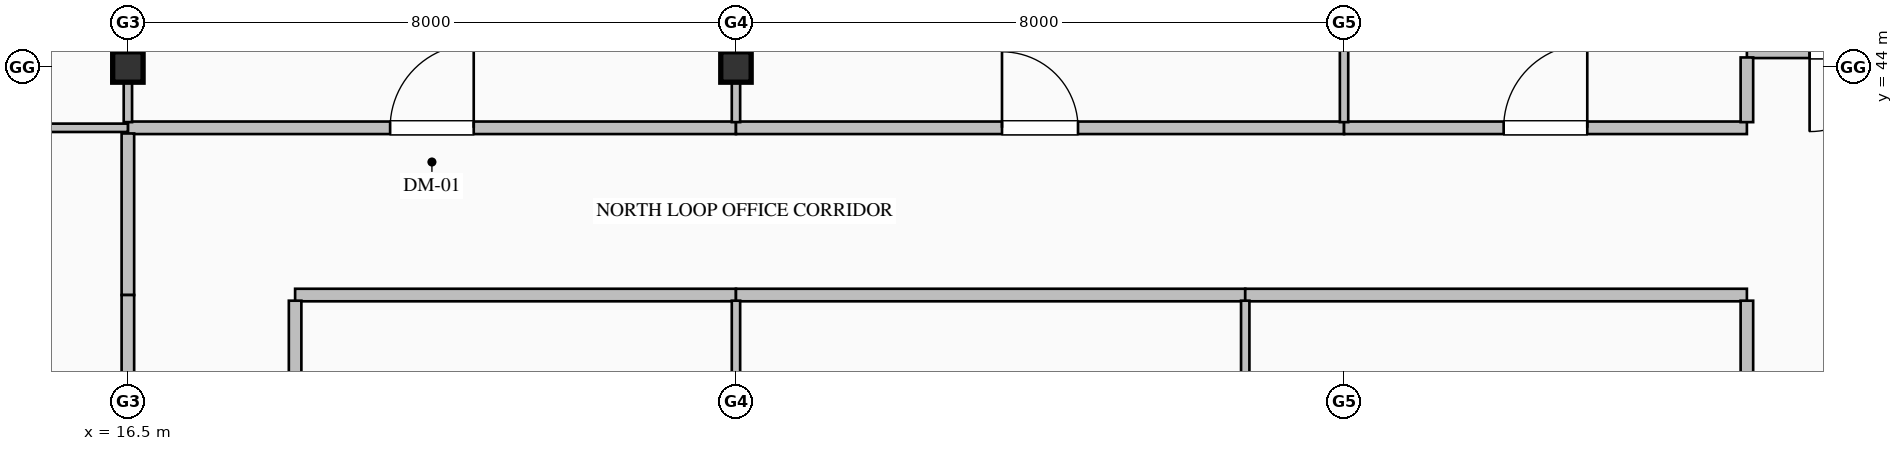
"""IFC4 building model, lengths in metres.
Left out: names, types, materials, properties, quantities, classifications, styles, units other than length and angle.
Written with IfcOpenShell. Run it as: python <this file> out.ifc"""

import sys

from ifc_helpers import new_model, si_unit, direction, frame, frame_2d, origin, origin_2d, place, context, subcontext, project, spatial, rectangle, i_section, extrude, element, fill, save


model = new_model("IFC4")
c1 = context("Model", 3, precision=1e-05, world=origin(), true_north=direction((0.0, 1.0)))
c2 = subcontext(c1, "Body", "Model", "MODEL_VIEW")
j1 = project(units=[si_unit("LENGTHUNIT", "METRE"), si_unit("PLANEANGLEUNIT", "RADIAN")], contexts=[c1])
p1 = place(None, origin())
s1 = spatial("IfcSite", under=j1, at=p1, CompositionType="ELEMENT")
p2 = place(p1, origin())
s2 = spatial("IfcBuilding", under=s1, at=p2, CompositionType="ELEMENT")
p3 = place(p2, frame((0.0, 0.0, 131.0)))
s3 = spatial("IfcBuildingStorey", under=s2, at=p3, CompositionType="ELEMENT", Elevation=131.0)
for number, where, z_axis, x_axis in (
    (1, (16.5, 44.0, 0.0), (0.0, 0.0, 1.0), (1.0, 0.0, 0.0)),
    (2, (24.5, 44.0, 0.0), (0.0, 0.0, 1.0), (1.0, 0.0, 0.0)),
):
    element("IfcColumn", number, at=place(p3, frame(where, z_axis=z_axis, x_axis=x_axis)), inside=s3, PredefinedType="COLUMN", context=c2, shape_type="SweptSolid", body=[
        extrude(i_section(OverallWidth=0.4, OverallDepth=0.4, WebThickness=0.013, FlangeThickness=0.021, FilletRadius=0.022, at=origin_2d()), origin(), (0.0, 0.0, 1.0), 4.0),
    ])
p4 = place(p3, frame((40.5, 44.2, 0.0), z_axis=(0.0, 0.0, 1.0), x_axis=(-1.0, 0.0, 0.0)))
e3 = element("IfcWall", 3, at=p4, inside=s3, PredefinedType="PARTITIONING", context=c2, shape_type="SweptSolid", body=[
    extrude(rectangle(XDim=2.7, YDim=0.165, at=frame_2d((1.35, 0.0))), origin(), (0.0, 0.0, 1.0), 3.765),
])
p5 = place(p4, frame((0.825, 0.0, 0.0)))
e4 = element("IfcOpeningElement", 4, at=p5, cuts=e3, PredefinedType="OPENING", context=c2, shape_type="SweptSolid", body=[
    extrude(rectangle(XDim=1.05, YDim=2.15, at=frame_2d((0.525, 1.075))), frame((0.0, 0.093, 0.0), z_axis=(0.0, -1.0, 0.0), x_axis=(1.0, 0.0, 0.0)), (0.0, 0.0, 1.0), 0.185),
])
p6 = place(p3, frame((16.5, 43.2, 0.0), z_axis=(0.0, 0.0, 1.0), x_axis=(1.0, 0.0, 0.0)))
e5 = element("IfcWall", 5, at=p6, inside=s3, PredefinedType="PARTITIONING", context=c2, shape_type="SweptSolid", body=[
    extrude(rectangle(XDim=8.0, YDim=0.165, at=frame_2d((4.0, 0.0))), origin(), (0.0, 0.0, 1.0), 3.765),
])
p7 = place(p6, frame((3.45, 0.0, 0.0)))
e6 = element("IfcOpeningElement", 6, at=p7, cuts=e5, PredefinedType="OPENING", context=c2, shape_type="SweptSolid", body=[
    extrude(rectangle(XDim=1.1, YDim=2.2, at=frame_2d((0.55, 1.1))), frame((0.0, 0.093, 0.0), z_axis=(0.0, -1.0, 0.0), x_axis=(1.0, 0.0, 0.0)), (0.0, 0.0, 1.0), 0.185),
])
p8 = place(p3, frame((24.5, 43.2, 0.0), z_axis=(0.0, 0.0, 1.0), x_axis=(1.0, 0.0, 0.0)))
e7 = element("IfcWall", 7, at=p8, inside=s3, PredefinedType="PARTITIONING", context=c2, shape_type="SweptSolid", body=[
    extrude(rectangle(XDim=8.0, YDim=0.165, at=frame_2d((4.0, 0.0))), origin(), (0.0, 0.0, 1.0), 3.765),
])
p9 = place(p8, frame((3.5, 0.0, 0.0)))
e8 = element("IfcOpeningElement", 8, at=p9, cuts=e7, PredefinedType="OPENING", context=c2, shape_type="SweptSolid", body=[
    extrude(rectangle(XDim=1.0, YDim=2.15, at=frame_2d((0.5, 1.075))), frame((0.0, 0.093, 0.0), z_axis=(0.0, -1.0, 0.0), x_axis=(1.0, 0.0, 0.0)), (0.0, 0.0, 1.0), 0.185),
])
p10 = place(p3, frame((32.5, 43.2, 0.0), z_axis=(0.0, 0.0, 1.0), x_axis=(1.0, 0.0, 0.0)))
e9 = element("IfcWall", 9, at=p10, inside=s3, PredefinedType="PARTITIONING", context=c2, shape_type="SweptSolid", body=[
    extrude(rectangle(XDim=5.3, YDim=0.165, at=frame_2d((2.65, 0.0))), origin(), (0.0, 0.0, 1.0), 3.765),
])
p11 = place(p10, frame((2.1, 0.0, 0.0)))
e10 = element("IfcOpeningElement", 10, at=p11, cuts=e9, PredefinedType="OPENING", context=c2, shape_type="SweptSolid", body=[
    extrude(rectangle(XDim=1.1, YDim=2.2, at=frame_2d((0.55, 1.1))), frame((0.0, 0.093, 0.0), z_axis=(0.0, -1.0, 0.0), x_axis=(1.0, 0.0, 0.0)), (0.0, 0.0, 1.0), 0.185),
])
p12 = place(p3, frame((24.5, 41.0, 0.0), z_axis=(0.0, 0.0, 1.0), x_axis=(-1.0, 0.0, 0.0)))
e11 = element("IfcWall", 11, at=p12, inside=s3, PredefinedType="PARTITIONING", context=c2, shape_type="SweptSolid", body=[
    extrude(rectangle(XDim=5.8, YDim=0.165, at=frame_2d((2.9, 0.0))), origin(), (0.0, 0.0, 1.0), 3.765),
])
p13 = place(p3, frame((31.2, 41.0, 0.0), z_axis=(0.0, 0.0, 1.0), x_axis=(-1.0, 0.0, 0.0)))
e12 = element("IfcWall", 12, at=p13, inside=s3, PredefinedType="PARTITIONING", context=c2, shape_type="SweptSolid", body=[
    extrude(rectangle(XDim=6.7, YDim=0.165, at=frame_2d((3.35, 0.0))), origin(), (0.0, 0.0, 1.0), 3.765),
])
p14 = place(p3, frame((37.8, 41.0, 0.0), z_axis=(0.0, 0.0, 1.0), x_axis=(-1.0, 0.0, 0.0)))
e13 = element("IfcWall", 13, at=p14, inside=s3, PredefinedType="PARTITIONING", context=c2, shape_type="SweptSolid", body=[
    extrude(rectangle(XDim=6.6, YDim=0.165, at=frame_2d((3.3, 0.0))), origin(), (0.0, 0.0, 1.0), 3.765),
])
p15 = place(p3, frame((16.5, 41.0, 0.0), z_axis=(0.0, 0.0, 1.0), x_axis=(0.0, 1.0, 0.0)))
e14 = element("IfcWall", 14, at=p15, inside=s3, PredefinedType="PARTITIONING", context=c2, shape_type="SweptSolid", body=[
    extrude(rectangle(XDim=2.125, YDim=0.165, at=frame_2d((1.063, 0.0))), origin(), (0.0, 0.0, 1.0), 3.157),
])
p16 = place(p3, frame((18.7, 40.926, 0.0), z_axis=(0.0, 0.0, 1.0), x_axis=(0.0, -1.0, 0.0)))
e15 = element("IfcWall", 15, at=p16, inside=s3, PredefinedType="PARTITIONING", context=c2, shape_type="SweptSolid", body=[
    extrude(rectangle(XDim=7.451, YDim=0.165, at=frame_2d((3.726, 0.0))), origin(), (0.0, 0.0, 1.0), 3.765),
])
p17 = place(p16, frame((3.176, 0.0, 0.0)))
e16 = element("IfcOpeningElement", 16, at=p17, cuts=e15, PredefinedType="OPENING", context=c2, shape_type="SweptSolid", body=[
    extrude(rectangle(XDim=1.1, YDim=2.2, at=frame_2d((0.55, 1.1))), frame((0.0, 0.093, 0.0), z_axis=(0.0, -1.0, 0.0), x_axis=(1.0, 0.0, 0.0)), (0.0, 0.0, 1.0), 0.185),
])
p18 = place(p3, frame((16.5, 33.4, 0.0), z_axis=(0.0, 0.0, 1.0), x_axis=(0.0, 1.0, 0.0)))
e17 = element("IfcWall", 17, at=p18, inside=s3, PredefinedType="PARTITIONING", context=c2, shape_type="SweptSolid", body=[
    extrude(rectangle(XDim=7.6, YDim=0.165, at=frame_2d((3.8, 0.0))), origin(), (0.0, 0.0, 1.0), 3.157),
])
p19 = place(p18, frame((3.3, 0.0, 0.0)))
e18 = element("IfcOpeningElement", 18, at=p19, cuts=e17, PredefinedType="OPENING", context=c2, shape_type="SweptSolid", body=[
    extrude(rectangle(XDim=1.0, YDim=2.15, at=frame_2d((0.5, 1.075))), frame((0.0, 0.093, 0.0), z_axis=(0.0, -1.0, 0.0), x_axis=(1.0, 0.0, 0.0)), (0.0, 0.0, 1.0), 0.185),
])
p20 = place(p3, frame((37.8, 43.274, 0.0), z_axis=(0.0, 0.0, 1.0), x_axis=(0.0, 1.0, 0.0)))
e19 = element("IfcWall", 19, at=p20, inside=s3, PredefinedType="PARTITIONING", context=c2, shape_type="SweptSolid", body=[
    extrude(rectangle(XDim=0.851, YDim=0.165, at=frame_2d((0.426, 0.0))), origin(), (0.0, 0.0, 1.0), 3.765),
])
p21 = place(p3, frame((37.8, 33.475, 0.0), z_axis=(0.0, 0.0, 1.0), x_axis=(0.0, 1.0, 0.0)))
e20 = element("IfcWall", 20, at=p21, inside=s3, PredefinedType="PARTITIONING", context=c2, shape_type="SweptSolid", body=[
    extrude(rectangle(XDim=7.451, YDim=0.165, at=frame_2d((3.726, 0.0))), origin(), (0.0, 0.0, 1.0), 3.765),
])
p22 = place(p21, frame((3.176, 0.0, 0.0)))
e21 = element("IfcOpeningElement", 21, at=p22, cuts=e20, PredefinedType="OPENING", context=c2, shape_type="SweptSolid", body=[
    extrude(rectangle(XDim=1.1, YDim=2.2, at=frame_2d((0.55, 1.1))), frame((0.0, 0.093, 0.0), z_axis=(0.0, -1.0, 0.0), x_axis=(1.0, 0.0, 0.0)), (0.0, 0.0, 1.0), 0.185),
])
p23 = place(p3, frame((16.5, 51.668, 0.0), z_axis=(0.0, 0.0, 1.0), x_axis=(0.0, -1.0, 0.0)))
e22 = element("IfcWall", 22, at=p23, inside=s3, PredefinedType="MOVABLE", context=c2, shape_type="SweptSolid", body=[
    extrude(rectangle(XDim=8.394, YDim=0.11, at=frame_2d((4.197, 0.0))), origin(), (0.0, 0.0, 1.0), 3.157),
])
p24 = place(p23, frame((3.647, 0.0, 0.0)))
e23 = element("IfcOpeningElement", 23, at=p24, cuts=e22, PredefinedType="OPENING", context=c2, shape_type="SweptSolid", body=[
    extrude(rectangle(XDim=1.1, YDim=2.2, at=frame_2d((0.55, 1.1))), frame((0.0, 0.065, 0.0), z_axis=(0.0, -1.0, 0.0), x_axis=(1.0, 0.0, 0.0)), (0.0, 0.0, 1.0), 0.13),
])
p25 = place(p3, frame((16.5, 43.2, 0.0), z_axis=(0.0, 0.0, 1.0), x_axis=(-1.0, 0.0, 0.0)))
e24 = element("IfcWall", 24, at=p25, inside=s3, PredefinedType="MOVABLE", context=c2, shape_type="SweptSolid", body=[
    extrude(rectangle(XDim=7.168, YDim=0.11, at=frame_2d((3.584, 0.0))), origin(), (0.0, 0.0, 1.0), 3.765),
])
p26 = place(p3, frame((24.5, 51.668, 0.0), z_axis=(0.0, 0.0, 1.0), x_axis=(0.0, -1.0, 0.0)))
e25 = element("IfcWall", 25, at=p26, inside=s3, PredefinedType="MOVABLE", context=c2, shape_type="SweptSolid", body=[
    extrude(rectangle(XDim=8.394, YDim=0.11, at=frame_2d((4.197, 0.0))), origin(), (0.0, 0.0, 1.0), 3.157),
])
p27 = place(p3, frame((32.5, 51.668, 0.0), z_axis=(0.0, 0.0, 1.0), x_axis=(0.0, -1.0, 0.0)))
e26 = element("IfcWall", 26, at=p27, inside=s3, PredefinedType="MOVABLE", context=c2, shape_type="SweptSolid", body=[
    extrude(rectangle(XDim=8.394, YDim=0.11, at=frame_2d((4.197, 0.0))), origin(), (0.0, 0.0, 1.0), 3.765),
])
p28 = place(p3, frame((24.5, 40.926, 0.0), z_axis=(0.0, 0.0, 1.0), x_axis=(0.0, -1.0, 0.0)))
e27 = element("IfcWall", 27, at=p28, inside=s3, PredefinedType="MOVABLE", context=c2, shape_type="SweptSolid", body=[
    extrude(rectangle(XDim=7.451, YDim=0.11, at=frame_2d((3.726, 0.0))), origin(), (0.0, 0.0, 1.0), 3.157),
])
p29 = place(p3, frame((31.2, 40.926, 0.0), z_axis=(0.0, 0.0, 1.0), x_axis=(0.0, -1.0, 0.0)))
e28 = element("IfcWall", 28, at=p29, inside=s3, PredefinedType="MOVABLE", context=c2, shape_type="SweptSolid", body=[
    extrude(rectangle(XDim=7.451, YDim=0.11, at=frame_2d((3.726, 0.0))), origin(), (0.0, 0.0, 1.0), 3.765),
])
p30 = place(p5, origin())
e29 = element("IfcDoor", 29, at=p30, inside=s3, OperationType="SINGLE_SWING_RIGHT", PredefinedType="DOOR", context=c2, shape_type="SweptSolid", body=[
    extrude(rectangle(XDim=1.05, YDim=2.15, at=frame_2d((0.525, 1.075))), frame((0.0, 0.025, 0.0), z_axis=(0.0, -1.0, 0.0), x_axis=(1.0, 0.0, 0.0)), (0.0, 0.0, 1.0), 0.05),
])
fill(e4, e29)
p31 = place(p7, origin())
e30 = element("IfcDoor", 30, at=p31, inside=s3, OperationType="SINGLE_SWING_RIGHT", PredefinedType="DOOR", context=c2, shape_type="SweptSolid", body=[
    extrude(rectangle(XDim=1.1, YDim=2.2, at=frame_2d((0.55, 1.1))), frame((0.0, 0.025, 0.0), z_axis=(0.0, -1.0, 0.0), x_axis=(1.0, 0.0, 0.0)), (0.0, 0.0, 1.0), 0.05),
])
fill(e6, e30)
p32 = place(p9, origin())
e31 = element("IfcDoor", 31, at=p32, inside=s3, OperationType="SINGLE_SWING_LEFT", PredefinedType="DOOR", context=c2, shape_type="SweptSolid", body=[
    extrude(rectangle(XDim=1.0, YDim=2.15, at=frame_2d((0.5, 1.075))), frame((0.0, 0.025, 0.0), z_axis=(0.0, -1.0, 0.0), x_axis=(1.0, 0.0, 0.0)), (0.0, 0.0, 1.0), 0.05),
])
fill(e8, e31)
p33 = place(p11, origin())
e32 = element("IfcDoor", 32, at=p33, inside=s3, OperationType="SINGLE_SWING_RIGHT", PredefinedType="DOOR", context=c2, shape_type="SweptSolid", body=[
    extrude(rectangle(XDim=1.1, YDim=2.2, at=frame_2d((0.55, 1.1))), frame((0.0, 0.025, 0.0), z_axis=(0.0, -1.0, 0.0), x_axis=(1.0, 0.0, 0.0)), (0.0, 0.0, 1.0), 0.05),
])
fill(e10, e32)
save(model, sys.argv[1])
